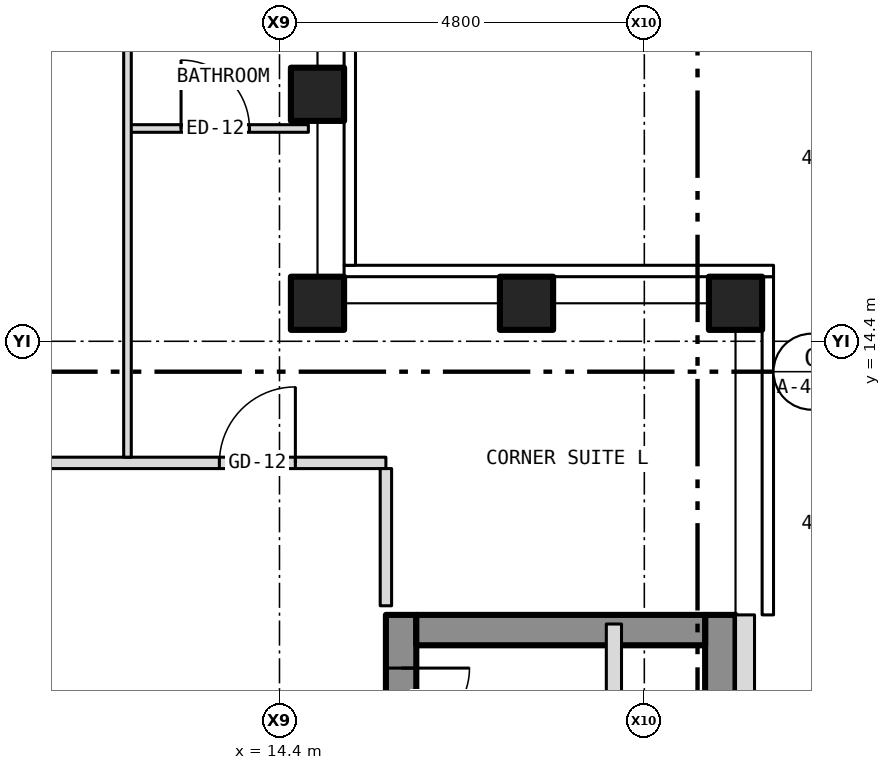
"""IFC4 building model, lengths in metres.
Left out: names, types, materials, properties, quantities, classifications, styles, units other than length and angle.
Written with IfcOpenShell. Run it as: python <this file> out.ifc"""

import sys

from ifc_helpers import new_model, si_unit, direction, frame, frame_2d, origin, origin_2d, place, context, subcontext, project, spatial, rectangle, hollow_rectangle, extrude, element, fill, save


model = new_model("IFC4")
c1 = context("Model", 3, precision=1e-05, world=origin(), true_north=direction((0.0, 1.0)))
c2 = subcontext(c1, "Body", "Model", "MODEL_VIEW")
j1 = project(units=[si_unit("LENGTHUNIT", "METRE"), si_unit("PLANEANGLEUNIT", "RADIAN")], contexts=[c1])
p1 = place(None, origin())
s1 = spatial("IfcSite", under=j1, at=p1, CompositionType="ELEMENT")
p2 = place(p1, origin())
s2 = spatial("IfcBuilding", under=s1, at=p2, CompositionType="ELEMENT")
p3 = place(p2, frame((0.0, 0.0, 205.0)))
s3 = spatial("IfcBuildingStorey", under=s2, at=p3, CompositionType="ELEMENT", Elevation=205.0)
for number, where, z_axis, x_axis in (
    (1, (20.4, 14.9, -0.15), (0.0, 0.0, 1.0), (1.0, 0.0, 0.0)),
    (2, (14.9, 14.9, -0.15), (0.0, 0.0, 1.0), (1.0, 0.0, 0.0)),
    (3, (14.9, 17.65, -0.15), (0.0, 0.0, 1.0), (1.0, 0.0, 0.0)),
    (4, (17.65, 14.9, -0.15), (0.0, 0.0, 1.0), (1.0, 0.0, 0.0)),
):
    element("IfcColumn", number, at=place(p3, frame(where, z_axis=z_axis, x_axis=x_axis)), inside=s3, PredefinedType="COLUMN", context=c2, shape_type="SweptSolid", body=[
        extrude(hollow_rectangle(XDim=0.7, YDim=0.7, WallThickness=0.04, at=origin_2d()), origin(), (0.0, 0.0, 1.0), 3.5),
    ])
p4 = place(p3, frame((16.0, -10.8, 0.0), z_axis=(0.0, 0.0, 1.0), x_axis=(0.0, 1.0, 0.0)))
e5 = element("IfcWall", 5, at=p4, inside=s3, PredefinedType="SHEAR", context=c2, shape_type="SweptSolid", body=[
    extrude(rectangle(XDim=21.6, YDim=0.4, at=frame_2d((10.8, 0.0))), origin(), (0.0, 0.0, 1.0), 3.25),
])
p5 = place(p4, frame((9.4, 0.0, 0.0)))
e6 = element("IfcOpeningElement", 6, at=p5, cuts=e5, PredefinedType="OPENING", context=c2, shape_type="SweptSolid", body=[
    extrude(rectangle(XDim=1.1, YDim=2.1, at=frame_2d((0.55, 1.05))), frame((0.0, 0.212, 0.0), z_axis=(0.0, -1.0, 0.0), x_axis=(1.0, 0.0, 0.0)), (0.0, 0.0, 1.0), 0.424),
])
p6 = place(p4, frame((11.5, 0.0, 0.0)))
e7 = element("IfcOpeningElement", 7, at=p6, cuts=e5, PredefinedType="OPENING", context=c2, shape_type="SweptSolid", body=[
    extrude(rectangle(XDim=1.1, YDim=2.1, at=frame_2d((0.55, 1.05))), frame((0.0, 0.212, 0.0), z_axis=(0.0, -1.0, 0.0), x_axis=(1.0, 0.0, 0.0)), (0.0, 0.0, 1.0), 0.424),
])
p7 = place(p4, frame((13.6, 0.0, 0.0)))
e8 = element("IfcOpeningElement", 8, at=p7, cuts=e5, PredefinedType="OPENING", context=c2, shape_type="SweptSolid", body=[
    extrude(rectangle(XDim=1.1, YDim=2.1, at=frame_2d((0.55, 1.05))), frame((0.0, 0.212, 0.0), z_axis=(0.0, -1.0, 0.0), x_axis=(1.0, 0.0, 0.0)), (0.0, 0.0, 1.0), 0.424),
])
p8 = place(p4, frame((15.7, 0.0, 0.0)))
e9 = element("IfcOpeningElement", 9, at=p8, cuts=e5, PredefinedType="OPENING", context=c2, shape_type="SweptSolid", body=[
    extrude(rectangle(XDim=1.1, YDim=2.1, at=frame_2d((0.55, 1.05))), frame((0.0, 0.212, 0.0), z_axis=(0.0, -1.0, 0.0), x_axis=(1.0, 0.0, 0.0)), (0.0, 0.0, 1.0), 0.424),
])
p9 = place(p4, frame((17.8, 0.0, 0.0)))
e10 = element("IfcOpeningElement", 10, at=p9, cuts=e5, PredefinedType="OPENING", context=c2, shape_type="SweptSolid", body=[
    extrude(rectangle(XDim=1.1, YDim=2.1, at=frame_2d((0.55, 1.05))), frame((0.0, 0.212, 0.0), z_axis=(0.0, -1.0, 0.0), x_axis=(1.0, 0.0, 0.0)), (0.0, 0.0, 1.0), 0.424),
])
p10 = place(p4, frame((5.642, 0.0, 0.0)))
e11 = element("IfcOpeningElement", 11, at=p10, cuts=e5, PredefinedType="OPENING", context=c2, shape_type="SweptSolid", body=[
    extrude(rectangle(XDim=1.1, YDim=2.1, at=frame_2d((0.55, 1.05))), frame((0.0, 0.212, 0.0), z_axis=(0.0, -1.0, 0.0), x_axis=(1.0, 0.0, 0.0)), (0.0, 0.0, 1.0), 0.424),
])
p11 = place(p4, frame((7.5, 0.0, 0.0)))
e12 = element("IfcOpeningElement", 12, at=p11, cuts=e5, PredefinedType="OPENING", context=c2, shape_type="SweptSolid", body=[
    extrude(rectangle(XDim=1.1, YDim=2.1, at=frame_2d((0.55, 1.05))), frame((0.0, 0.212, 0.0), z_axis=(0.0, -1.0, 0.0), x_axis=(1.0, 0.0, 0.0)), (0.0, 0.0, 1.0), 0.424),
])
p12 = place(p4, frame((20.0, 0.0, 0.0)))
e13 = element("IfcOpeningElement", 13, at=p12, cuts=e5, PredefinedType="OPENING", context=c2, shape_type="SweptSolid", body=[
    extrude(rectangle(XDim=0.9, YDim=2.1, at=frame_2d((0.45, 1.05))), frame((0.0, 0.212, 0.0), z_axis=(0.0, -1.0, 0.0), x_axis=(1.0, 0.0, 0.0)), (0.0, 0.0, 1.0), 0.424),
])
p13 = place(p3, frame((20.2, -10.8, 0.0), z_axis=(0.0, 0.0, 1.0), x_axis=(0.0, 1.0, 0.0)))
e14 = element("IfcWall", 14, at=p13, inside=s3, PredefinedType="SHEAR", context=c2, shape_type="SweptSolid", body=[
    extrude(rectangle(XDim=21.6, YDim=0.4, at=frame_2d((10.8, 0.0))), origin(), (0.0, 0.0, 1.0), 3.25),
])
p14 = place(p3, frame((16.2, 10.6, 0.0), z_axis=(0.0, 0.0, 1.0), x_axis=(1.0, 0.0, 0.0)))
e15 = element("IfcWall", 15, at=p14, inside=s3, PredefinedType="SHEAR", context=c2, shape_type="SweptSolid", body=[
    extrude(rectangle(XDim=3.8, YDim=0.4, at=frame_2d((1.9, 0.0))), origin(), (0.0, 0.0, 1.0), 3.25),
])
p15 = place(p3, frame((20.525, -10.8, 0.0), z_axis=(0.0, 0.0, 1.0), x_axis=(0.0, 1.0, 0.0)))
e16 = element("IfcWall", 16, at=p15, inside=s3, PredefinedType="SOLIDWALL", context=c2, shape_type="SweptSolid", body=[
    extrude(rectangle(XDim=21.6, YDim=0.25, at=frame_2d((10.8, 0.0))), origin(), (0.0, 0.0, 1.0), 3.5),
])
p16 = place(p15, frame((2.95, 0.0, 1.0)))
e17 = element("IfcOpeningElement", 17, at=p16, cuts=e16, PredefinedType="OPENING", context=c2, shape_type="SweptSolid", body=[
    extrude(rectangle(XDim=0.6, YDim=1.5, at=frame_2d((0.3, 0.75))), frame((0.0, 0.137, 0.0), z_axis=(0.0, -1.0, 0.0), x_axis=(1.0, 0.0, 0.0)), (0.0, 0.0, 1.0), 0.274),
])
p17 = place(p3, frame((-15.8, 12.8, 0.0), z_axis=(0.0, 0.0, 1.0), x_axis=(1.0, 0.0, 0.0)))
e18 = element("IfcWall", 18, at=p17, inside=s3, PredefinedType="PARTITIONING", context=c2, shape_type="SweptSolid", body=[
    extrude(rectangle(XDim=31.6, YDim=0.15, at=frame_2d((15.8, 0.0))), origin(), (0.0, 0.0, 1.0), 3.35),
])
p18 = place(p17, frame((4.267, 0.0, 0.0)))
e19 = element("IfcOpeningElement", 19, at=p18, cuts=e18, PredefinedType="OPENING", context=c2, shape_type="SweptSolid", body=[
    extrude(rectangle(XDim=1.0, YDim=2.1, at=frame_2d((0.5, 1.05))), frame((0.0, 0.087, 0.0), z_axis=(0.0, -1.0, 0.0), x_axis=(1.0, 0.0, 0.0)), (0.0, 0.0, 1.0), 0.174),
])
p19 = place(p17, frame((12.675, 0.0, 0.0)))
e20 = element("IfcOpeningElement", 20, at=p19, cuts=e18, PredefinedType="OPENING", context=c2, shape_type="SweptSolid", body=[
    extrude(rectangle(XDim=1.0, YDim=2.1, at=frame_2d((0.5, 1.05))), frame((0.0, 0.087, 0.0), z_axis=(0.0, -1.0, 0.0), x_axis=(1.0, 0.0, 0.0)), (0.0, 0.0, 1.0), 0.174),
])
p20 = place(p17, frame((16.684, 0.0, 0.0)))
e21 = element("IfcOpeningElement", 21, at=p20, cuts=e18, PredefinedType="OPENING", context=c2, shape_type="SweptSolid", body=[
    extrude(rectangle(XDim=1.0, YDim=2.1, at=frame_2d((0.5, 1.05))), frame((0.0, 0.087, 0.0), z_axis=(0.0, -1.0, 0.0), x_axis=(1.0, 0.0, 0.0)), (0.0, 0.0, 1.0), 0.174),
])
p21 = place(p17, frame((25.092, 0.0, 0.0)))
e22 = element("IfcOpeningElement", 22, at=p21, cuts=e18, PredefinedType="OPENING", context=c2, shape_type="SweptSolid", body=[
    extrude(rectangle(XDim=1.0, YDim=2.1, at=frame_2d((0.5, 1.05))), frame((0.0, 0.087, 0.0), z_axis=(0.0, -1.0, 0.0), x_axis=(1.0, 0.0, 0.0)), (0.0, 0.0, 1.0), 0.174),
])
p22 = place(p17, frame((1.192, 0.0, 0.0)))
e23 = element("IfcOpeningElement", 23, at=p22, cuts=e18, PredefinedType="OPENING", context=c2, shape_type="SweptSolid", body=[
    extrude(rectangle(XDim=1.0, YDim=2.1, at=frame_2d((0.5, 1.05))), frame((0.0, 0.087, 0.0), z_axis=(0.0, -1.0, 0.0), x_axis=(1.0, 0.0, 0.0)), (0.0, 0.0, 1.0), 0.174),
])
p23 = place(p17, frame((29.409, 0.0, 0.0)))
e24 = element("IfcOpeningElement", 24, at=p23, cuts=e18, PredefinedType="OPENING", context=c2, shape_type="SweptSolid", body=[
    extrude(rectangle(XDim=1.0, YDim=2.1, at=frame_2d((0.5, 1.05))), frame((0.0, 0.087, 0.0), z_axis=(0.0, -1.0, 0.0), x_axis=(1.0, 0.0, 0.0)), (0.0, 0.0, 1.0), 0.174),
])
p24 = place(p3, frame((12.4, 17.2, 0.0), z_axis=(0.0, 0.0, 1.0), x_axis=(1.0, 0.0, 0.0)))
e25 = element("IfcWall", 25, at=p24, inside=s3, PredefinedType="PARTITIONING", context=c2, shape_type="SweptSolid", body=[
    extrude(rectangle(XDim=2.38, YDim=0.1, at=frame_2d((1.19, 0.0))), origin(), (0.0, 0.0, 1.0), 3.35),
])
p25 = place(p24, frame((0.705, 0.0, 0.0)))
e26 = element("IfcOpeningElement", 26, at=p25, cuts=e25, PredefinedType="OPENING", context=c2, shape_type="SweptSolid", body=[
    extrude(rectangle(XDim=0.9, YDim=2.1, at=frame_2d((0.45, 1.05))), frame((0.0, 0.062, 0.0), z_axis=(0.0, -1.0, 0.0), x_axis=(1.0, 0.0, 0.0)), (0.0, 0.0, 1.0), 0.124),
])
p26 = place(p3, frame((12.4, 12.875, 0.0), z_axis=(0.0, 0.0, 1.0), x_axis=(0.0, 1.0, 0.0)))
e27 = element("IfcWall", 27, at=p26, inside=s3, PredefinedType="PARTITIONING", context=c2, shape_type="SweptSolid", body=[
    extrude(rectangle(XDim=7.905, YDim=0.1, at=frame_2d((3.953, 0.0))), origin(), (0.0, 0.0, 1.0), 3.35),
])
p27 = place(p3, frame((15.8, 10.92, 0.0), z_axis=(0.0, 0.0, 1.0), x_axis=(0.0, 1.0, 0.0)))
e28 = element("IfcWall", 28, at=p27, inside=s3, PredefinedType="PARTITIONING", context=c2, shape_type="SweptSolid", body=[
    extrude(rectangle(XDim=1.805, YDim=0.15, at=frame_2d((0.903, 0.0))), origin(), (0.0, 0.0, 1.0), 3.35),
])
p28 = place(p3, frame((18.8, -1.8, 0.0), z_axis=(0.0, 0.0, 1.0), x_axis=(0.0, 1.0, 0.0)))
e29 = element("IfcWall", 29, at=p28, inside=s3, PredefinedType="PARTITIONING", context=c2, shape_type="SweptSolid", body=[
    extrude(rectangle(XDim=12.48, YDim=0.2, at=frame_2d((6.24, 0.0))), origin(), (0.0, 0.0, 1.0), 3.25),
])
p29 = place(p12, origin())
e30 = element("IfcDoor", 30, at=p29, inside=s3, OperationType="SINGLE_SWING_RIGHT", PredefinedType="DOOR", context=c2, shape_type="SweptSolid", body=[
    extrude(rectangle(XDim=0.9, YDim=2.1, at=frame_2d((0.45, 1.05))), frame((0.0, 0.025, 0.0), z_axis=(0.0, -1.0, 0.0), x_axis=(1.0, 0.0, 0.0)), (0.0, 0.0, 1.0), 0.05),
])
fill(e13, e30)
p30 = place(p25, origin())
e31 = element("IfcDoor", 31, at=p30, inside=s3, OperationType="SINGLE_SWING_LEFT", PredefinedType="DOOR", context=c2, shape_type="SweptSolid", body=[
    extrude(rectangle(XDim=0.9, YDim=2.1, at=frame_2d((0.45, 1.05))), frame((0.0, 0.025, 0.0), z_axis=(0.0, -1.0, 0.0), x_axis=(1.0, 0.0, 0.0)), (0.0, 0.0, 1.0), 0.05),
])
fill(e26, e31)
p31 = place(p23, origin())
e32 = element("IfcDoor", 32, at=p31, inside=s3, OperationType="SINGLE_SWING_RIGHT", PredefinedType="DOOR", context=c2, shape_type="SweptSolid", body=[
    extrude(rectangle(XDim=1.0, YDim=2.1, at=frame_2d((0.5, 1.05))), frame((0.0, 0.025, 0.0), z_axis=(0.0, -1.0, 0.0), x_axis=(1.0, 0.0, 0.0)), (0.0, 0.0, 1.0), 0.05),
])
fill(e24, e32)
save(model, sys.argv[1])
